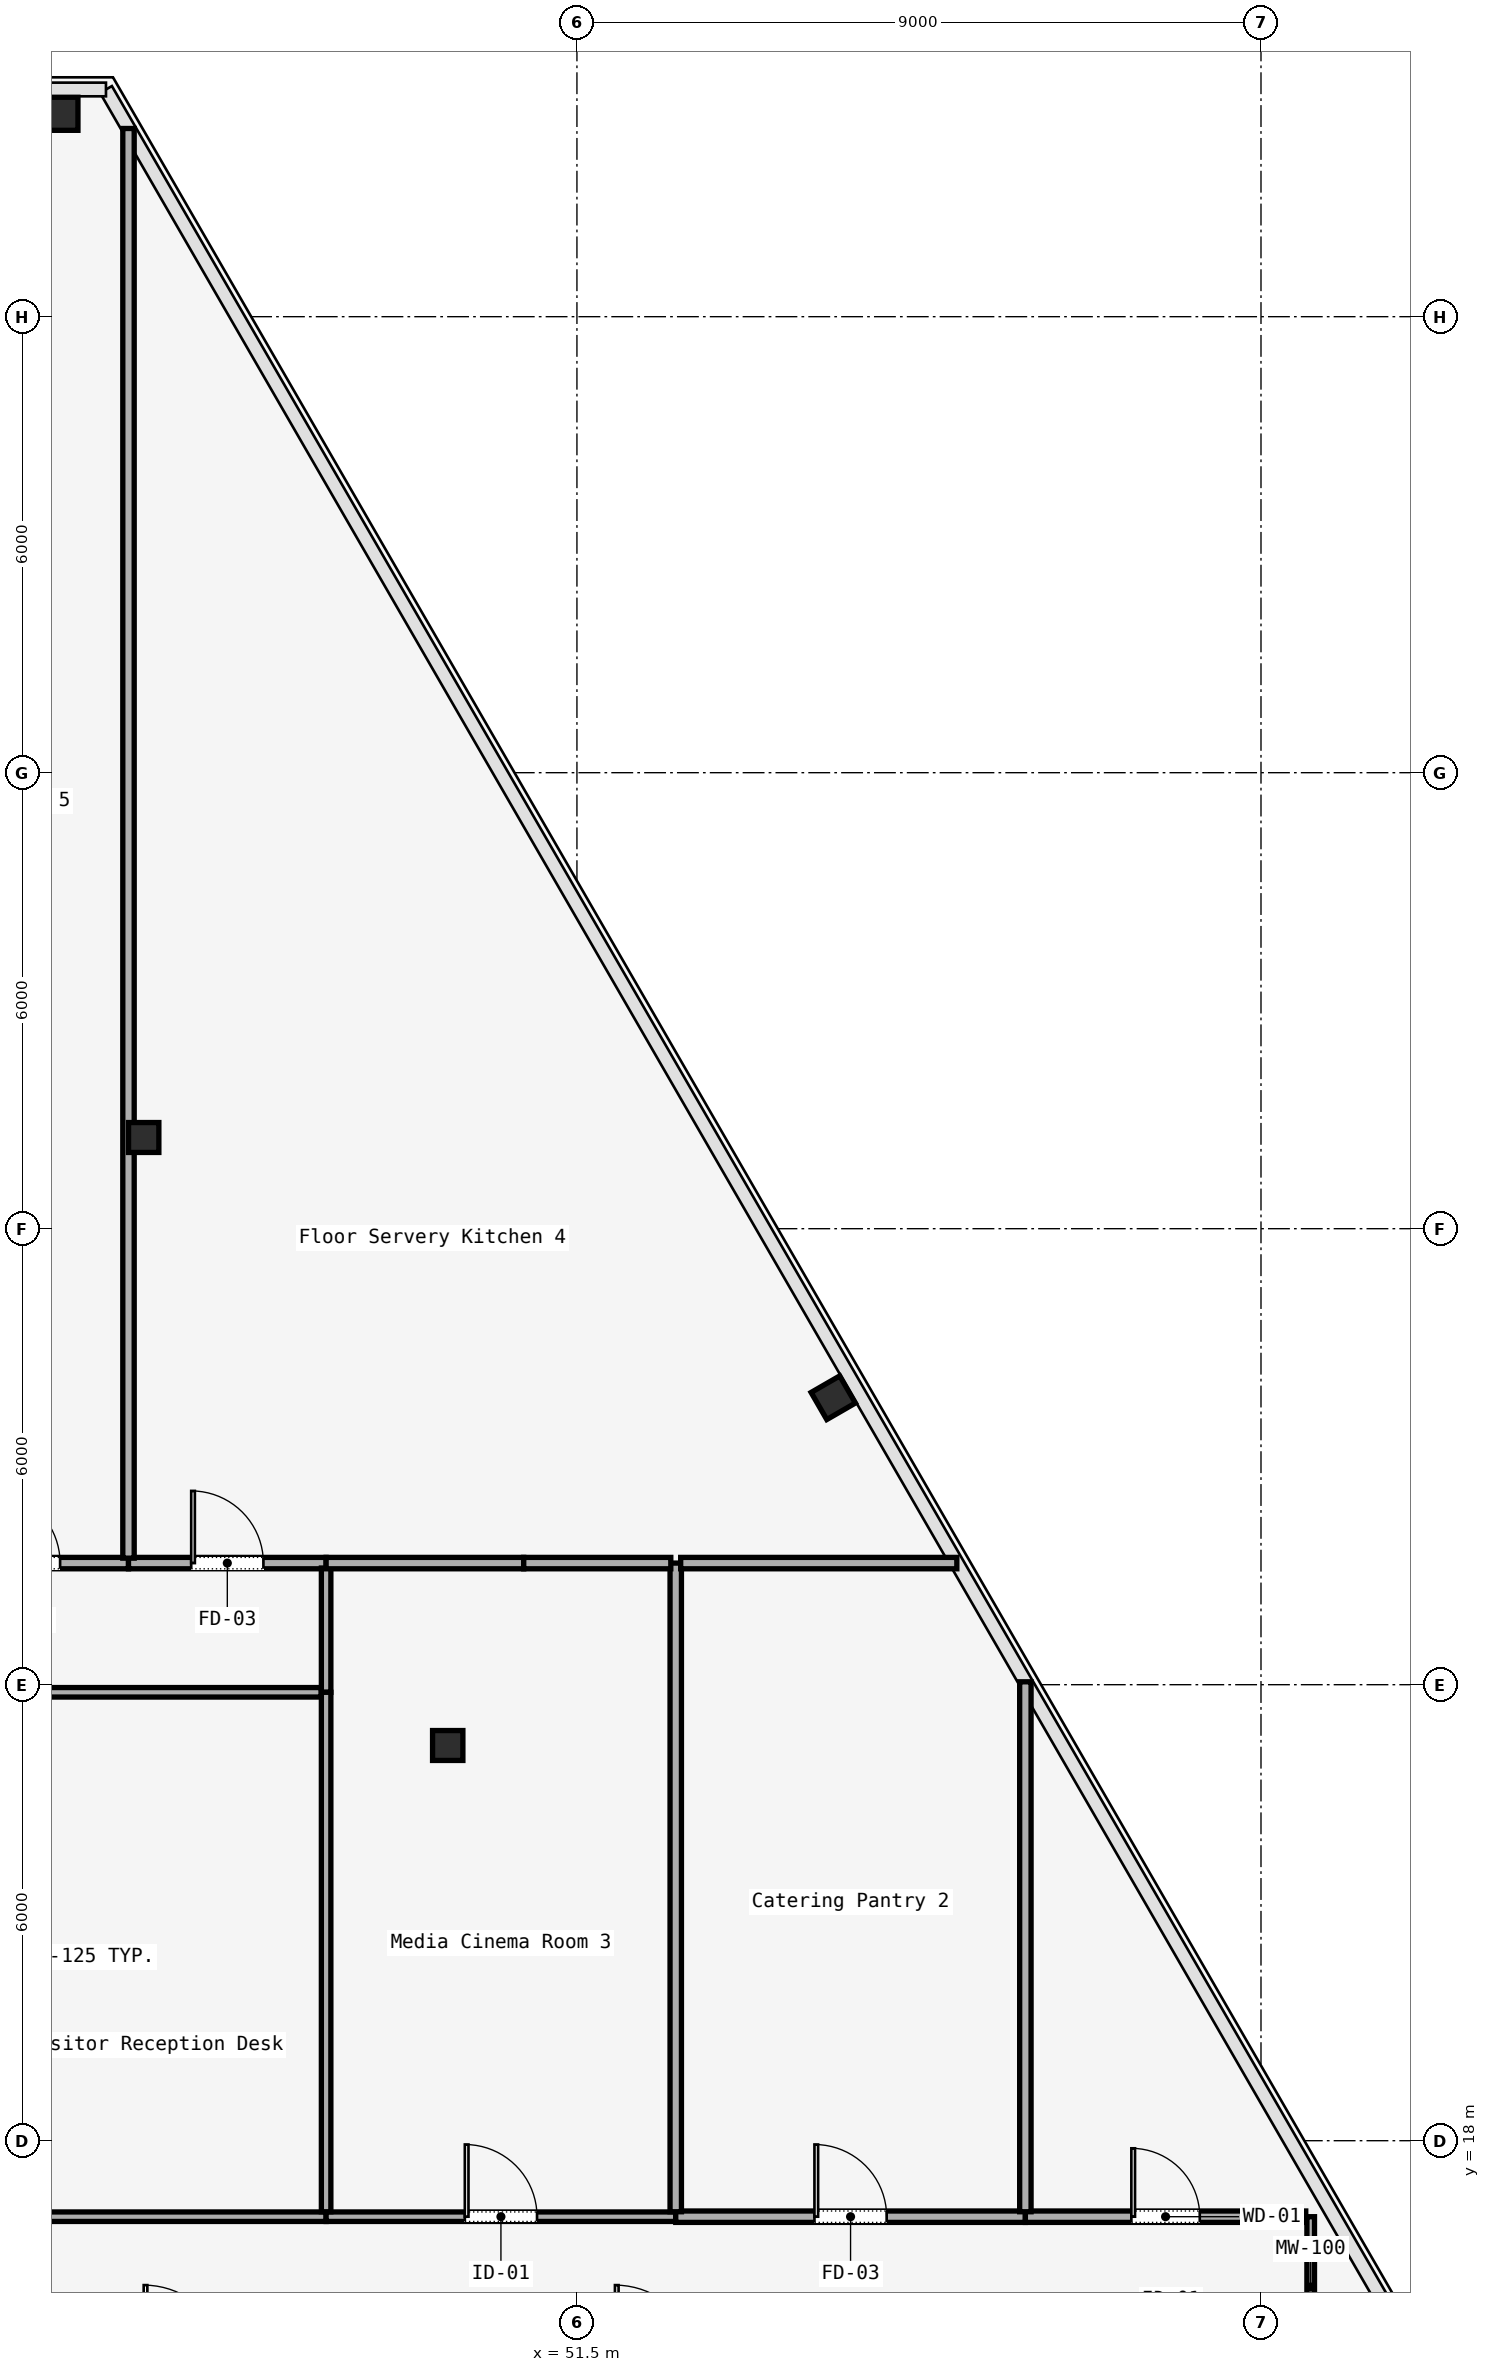
"""IFC4 building model, lengths in metres.
Left out: names, types, materials, properties, quantities, classifications, styles, units other than length and angle.
Written with IfcOpenShell. Run it as: python <this file> out.ifc"""

import sys

from ifc_helpers import new_model, si_unit, direction, frame, frame_2d, origin, origin_2d, place, context, subcontext, project, spatial, rectangle, i_section, extrude, element, fill, save


model = new_model("IFC4")
c1 = context("Model", 3, precision=1e-05, world=origin(), true_north=direction((0.0, 1.0)))
c2 = subcontext(c1, "Body", "Model", "MODEL_VIEW")
j1 = project(units=[si_unit("LENGTHUNIT", "METRE"), si_unit("PLANEANGLEUNIT", "RADIAN")], contexts=[c1])
p1 = place(None, origin())
s1 = spatial("IfcSite", under=j1, at=p1, CompositionType="ELEMENT")
p2 = place(p1, origin())
s2 = spatial("IfcBuilding", under=s1, at=p2, CompositionType="ELEMENT")
p3 = place(p2, frame((0.0, 0.0, 244.6)))
s3 = spatial("IfcBuildingStorey", under=s2, at=p3, CompositionType="ELEMENT", Elevation=244.6)
for number, where, z_axis, x_axis in (
    (1, (49.8, 23.2, 0.0), (0.0, 0.0, 1.0), (1.0, 0.0, 0.0)),
    (2, (45.8, 31.2, 0.0), (0.0, 0.0, 1.0), (1.0, 0.0, 0.0)),
):
    element("IfcColumn", number, at=place(p3, frame(where, z_axis=z_axis, x_axis=x_axis)), inside=s3, PredefinedType="COLUMN", context=c2, shape_type="SweptSolid", body=[
        extrude(i_section(OverallWidth=0.399, OverallDepth=0.394, WebThickness=0.023, FlangeThickness=0.037, FilletRadius=0.015, at=origin_2d()), origin(), (0.0, 0.0, 1.0), 3.58),
    ])
for number, where, z_axis, x_axis in (
    (3, (54.873, 27.776, 0.0), (0.0, 0.0, 1.0), (-0.5, 0.866, 0.0)),
    (4, (44.729, 44.67, 0.0), (0.0, 0.0, 1.0), (1.0, 0.0, 0.0)),
):
    element("IfcColumn", number, at=place(p3, frame(where, z_axis=z_axis, x_axis=x_axis)), inside=s3, PredefinedType="COLUMN", context=c2, shape_type="SweptSolid", body=[
        extrude(i_section(OverallWidth=0.412, OverallDepth=0.435, WebThickness=0.036, FlangeThickness=0.044, FilletRadius=0.015, at=origin_2d()), origin(), (0.0, 0.0, 1.0), 3.58),
    ])
p4 = place(p3, frame((61.154, 17.0, 0.0), z_axis=(0.0, 0.0, 1.0), x_axis=(0.0, -1.0, 0.0)))
e5 = element("IfcWall", 5, at=p4, inside=s3, PredefinedType="MOVABLE", context=c2, shape_type="SweptSolid", body=[
    extrude(rectangle(XDim=1.85, YDim=0.1, at=frame_2d((0.925, 0.0))), origin(), (0.0, 0.0, 1.0), 3.01),
])
p5 = place(p3, frame((42.85, 25.6, 0.0), z_axis=(0.0, 0.0, 1.0), x_axis=(1.0, 0.0, 0.0)))
e6 = element("IfcWall", 6, at=p5, inside=s3, PredefinedType="PARTITIONING", context=c2, shape_type="SweptSolid", body=[
    extrude(rectangle(XDim=2.75, YDim=0.15, at=frame_2d((1.375, 0.0))), origin(), (0.0, 0.0, 1.0), 3.01),
])
p6 = place(p5, frame((0.9, 0.0, 0.0)))
e7 = element("IfcOpeningElement", 7, at=p6, cuts=e6, PredefinedType="OPENING", context=c2, shape_type="SweptSolid", body=[
    extrude(rectangle(XDim=0.95, YDim=2.2, at=frame_2d((0.475, 1.1))), frame((0.0, 0.075, 0.0), z_axis=(0.0, -1.0, 0.0), x_axis=(1.0, 0.0, 0.0)), (0.0, 0.0, 1.0), 0.15),
])
p7 = place(p3, frame((45.6, 25.6, 0.0), z_axis=(0.0, 0.0, 1.0), x_axis=(1.0, 0.0, 0.0)))
e8 = element("IfcWall", 8, at=p7, inside=s3, PredefinedType="PARTITIONING", context=c2, shape_type="SweptSolid", body=[
    extrude(rectangle(XDim=2.6, YDim=0.15, at=frame_2d((1.3, 0.0))), origin(), (0.0, 0.0, 1.0), 3.01),
])
p8 = place(p7, frame((0.825, 0.0, 0.0)))
e9 = element("IfcOpeningElement", 9, at=p8, cuts=e8, PredefinedType="OPENING", context=c2, shape_type="SweptSolid", body=[
    extrude(rectangle(XDim=0.95, YDim=2.2, at=frame_2d((0.475, 1.1))), frame((0.0, 0.075, 0.0), z_axis=(0.0, -1.0, 0.0), x_axis=(1.0, 0.0, 0.0)), (0.0, 0.0, 1.0), 0.15),
])
p9 = place(p3, frame((48.2, 25.535, 0.0), z_axis=(0.0, 0.0, 1.0), x_axis=(0.0, -1.0, 0.0)))
e10 = element("IfcWall", 10, at=p9, inside=s3, PredefinedType="PARTITIONING", context=c2, shape_type="SweptSolid", body=[
    extrude(rectangle(XDim=1.635, YDim=0.125, at=frame_2d((0.817, 0.0))), origin(), (0.0, 0.0, 1.0), 3.01),
])
for number, where, z_axis, x_axis in (
    (11, (48.135, 23.9, 0.0), (0.0, 0.0, 1.0), (-1.0, 0.0, 0.0)),
    (12, (42.915, 17.0, 0.0), (0.0, 0.0, 1.0), (1.0, 0.0, 0.0)),
):
    element("IfcWall", number, at=place(p3, frame(where, z_axis=z_axis, x_axis=x_axis)), inside=s3, PredefinedType="PARTITIONING", context=c2, shape_type="SweptSolid", body=[
        extrude(rectangle(XDim=5.285, YDim=0.125, at=frame_2d((2.643, 0.0))), origin(), (0.0, 0.0, 1.0), 3.01),
    ])
p10 = place(p3, frame((48.2, 17.0, 0.0), z_axis=(0.0, 0.0, 1.0), x_axis=(1.0, 0.0, 0.0)))
e13 = element("IfcWall", 13, at=p10, inside=s3, PredefinedType="PARTITIONING", context=c2, shape_type="SweptSolid", body=[
    extrude(rectangle(XDim=4.6, YDim=0.125, at=frame_2d((2.3, 0.0))), origin(), (0.0, 0.0, 1.0), 3.01),
])
p11 = place(p10, frame((1.825, 0.0, 0.0)))
e14 = element("IfcOpeningElement", 14, at=p11, cuts=e13, PredefinedType="OPENING", context=c2, shape_type="SweptSolid", body=[
    extrude(rectangle(XDim=0.95, YDim=2.2, at=frame_2d((0.475, 1.1))), frame((0.0, 0.062, 0.0), z_axis=(0.0, -1.0, 0.0), x_axis=(1.0, 0.0, 0.0)), (0.0, 0.0, 1.0), 0.125),
])
p12 = place(p3, frame((52.8, 17.0, 0.0), z_axis=(0.0, 0.0, 1.0), x_axis=(1.0, 0.0, 0.0)))
e15 = element("IfcWall", 15, at=p12, inside=s3, PredefinedType="PARTITIONING", context=c2, shape_type="SweptSolid", body=[
    extrude(rectangle(XDim=4.6, YDim=0.15, at=frame_2d((2.3, 0.0))), origin(), (0.0, 0.0, 1.0), 3.01),
])
p13 = place(p12, frame((1.825, 0.0, 0.0)))
e16 = element("IfcOpeningElement", 16, at=p13, cuts=e15, PredefinedType="OPENING", context=c2, shape_type="SweptSolid", body=[
    extrude(rectangle(XDim=0.95, YDim=2.2, at=frame_2d((0.475, 1.1))), frame((0.0, 0.075, 0.0), z_axis=(0.0, -1.0, 0.0), x_axis=(1.0, 0.0, 0.0)), (0.0, 0.0, 1.0), 0.15),
])
p14 = place(p3, frame((57.4, 17.0, 0.0), z_axis=(0.0, 0.0, 1.0), x_axis=(1.0, 0.0, 0.0)))
e17 = element("IfcWall", 17, at=p14, inside=s3, PredefinedType="PARTITIONING", context=c2, shape_type="SweptSolid", body=[
    extrude(rectangle(XDim=3.689, YDim=0.15, at=frame_2d((1.845, 0.0))), origin(), (0.0, 0.0, 1.0), 3.01),
])
p15 = place(p14, frame((1.395, 0.0, 0.0)))
e18 = element("IfcOpeningElement", 18, at=p15, cuts=e17, PredefinedType="OPENING", context=c2, shape_type="SweptSolid", body=[
    extrude(rectangle(XDim=0.9, YDim=2.15, at=frame_2d((0.45, 1.075))), frame((0.0, 0.075, 0.0), z_axis=(0.0, -1.0, 0.0), x_axis=(1.0, 0.0, 0.0)), (0.0, 0.0, 1.0), 0.15),
])
p16 = place(p3, frame((57.4, 17.065, 0.0), z_axis=(0.0, 0.0, 1.0), x_axis=(0.0, 1.0, 0.0)))
e19 = element("IfcWall", 19, at=p16, inside=s3, PredefinedType="PARTITIONING", context=c2, shape_type="SweptSolid", body=[
    extrude(rectangle(XDim=6.973, YDim=0.15, at=frame_2d((3.487, 0.0))), origin(), (0.0, 0.0, 1.0), 3.01),
])
p17 = place(p3, frame((48.2, 23.9, 0.0), z_axis=(0.0, 0.0, 1.0), x_axis=(0.0, -1.0, 0.0)))
e20 = element("IfcWall", 20, at=p17, inside=s3, PredefinedType="PARTITIONING", context=c2, shape_type="SweptSolid", body=[
    extrude(rectangle(XDim=6.835, YDim=0.125, at=frame_2d((3.417, 0.0))), origin(), (0.0, 0.0, 1.0), 3.01),
])
p18 = place(p3, frame((52.8, 17.065, 0.0), z_axis=(0.0, 0.0, 1.0), x_axis=(0.0, 1.0, 0.0)))
e21 = element("IfcWall", 21, at=p18, inside=s3, PredefinedType="PARTITIONING", context=c2, shape_type="SweptSolid", body=[
    extrude(rectangle(XDim=8.535, YDim=0.15, at=frame_2d((4.268, 0.0))), origin(), (0.0, 0.0, 1.0), 3.01),
])
p19 = place(p3, frame((52.865, 25.6, 0.0), z_axis=(0.0, 0.0, 1.0), x_axis=(1.0, 0.0, 0.0)))
e22 = element("IfcWall", 22, at=p19, inside=s3, PredefinedType="PARTITIONING", context=c2, shape_type="SweptSolid", body=[
    extrude(rectangle(XDim=3.633, YDim=0.15, at=frame_2d((1.817, 0.0))), origin(), (0.0, 0.0, 1.0), 3.01),
])
p20 = place(p3, frame((48.2, 25.6, 0.0), z_axis=(0.0, 0.0, 1.0), x_axis=(1.0, 0.0, 0.0)))
e23 = element("IfcWall", 23, at=p20, inside=s3, PredefinedType="PARTITIONING", context=c2, shape_type="SweptSolid", body=[
    extrude(rectangle(XDim=2.6, YDim=0.15, at=frame_2d((1.3, 0.0))), origin(), (0.0, 0.0, 1.0), 3.01),
])
p21 = place(p3, frame((50.8, 25.6, 0.0), z_axis=(0.0, 0.0, 1.0), x_axis=(1.0, 0.0, 0.0)))
e24 = element("IfcWall", 24, at=p21, inside=s3, PredefinedType="PARTITIONING", context=c2, shape_type="SweptSolid", body=[
    extrude(rectangle(XDim=1.935, YDim=0.15, at=frame_2d((0.968, 0.0))), origin(), (0.0, 0.0, 1.0), 3.01),
])
p22 = place(p3, frame((45.6, 25.665, 0.0), z_axis=(0.0, 0.0, 1.0), x_axis=(0.0, 1.0, 0.0)))
e25 = element("IfcWall", 25, at=p22, inside=s3, PredefinedType="PARTITIONING", context=c2, shape_type="SweptSolid", body=[
    extrude(rectangle(XDim=18.811, YDim=0.15, at=frame_2d((9.406, 0.0))), origin(), (0.0, 0.0, 1.0), 3.01),
])
p23 = place(p15, origin())
e26 = element("IfcDoor", 26, at=p23, inside=s3, OperationType="SINGLE_SWING_RIGHT", PredefinedType="DOOR", context=c2, shape_type="SweptSolid", body=[
    extrude(rectangle(XDim=0.9, YDim=2.15, at=frame_2d((0.45, 1.075))), frame((0.0, 0.025, 0.0), z_axis=(0.0, -1.0, 0.0), x_axis=(1.0, 0.0, 0.0)), (0.0, 0.0, 1.0), 0.05),
])
fill(e18, e26)
p24 = place(p13, origin())
e27 = element("IfcDoor", 27, at=p24, inside=s3, OperationType="SINGLE_SWING_RIGHT", PredefinedType="DOOR", context=c2, shape_type="SweptSolid", body=[
    extrude(rectangle(XDim=0.95, YDim=2.2, at=frame_2d((0.475, 1.1))), frame((0.0, 0.025, 0.0), z_axis=(0.0, -1.0, 0.0), x_axis=(1.0, 0.0, 0.0)), (0.0, 0.0, 1.0), 0.05),
])
fill(e16, e27)
p25 = place(p11, origin())
e28 = element("IfcDoor", 28, at=p25, inside=s3, OperationType="SINGLE_SWING_LEFT", PredefinedType="DOOR", context=c2, shape_type="SweptSolid", body=[
    extrude(rectangle(XDim=0.95, YDim=2.2, at=frame_2d((0.475, 1.1))), frame((0.0, 0.025, 0.0), z_axis=(0.0, -1.0, 0.0), x_axis=(1.0, 0.0, 0.0)), (0.0, 0.0, 1.0), 0.05),
])
fill(e14, e28)
p26 = place(p8, origin())
e29 = element("IfcDoor", 29, at=p26, inside=s3, OperationType="SINGLE_SWING_RIGHT", PredefinedType="DOOR", context=c2, shape_type="SweptSolid", body=[
    extrude(rectangle(XDim=0.95, YDim=2.2, at=frame_2d((0.475, 1.1))), frame((0.0, 0.025, 0.0), z_axis=(0.0, -1.0, 0.0), x_axis=(1.0, 0.0, 0.0)), (0.0, 0.0, 1.0), 0.05),
])
fill(e9, e29)
p27 = place(p6, origin())
e30 = element("IfcDoor", 30, at=p27, inside=s3, OperationType="SINGLE_SWING_RIGHT", PredefinedType="DOOR", context=c2, shape_type="SweptSolid", body=[
    extrude(rectangle(XDim=0.95, YDim=2.2, at=frame_2d((0.475, 1.1))), frame((0.0, 0.025, 0.0), z_axis=(0.0, -1.0, 0.0), x_axis=(1.0, 0.0, 0.0)), (0.0, 0.0, 1.0), 0.05),
])
fill(e7, e30)
save(model, sys.argv[1])
